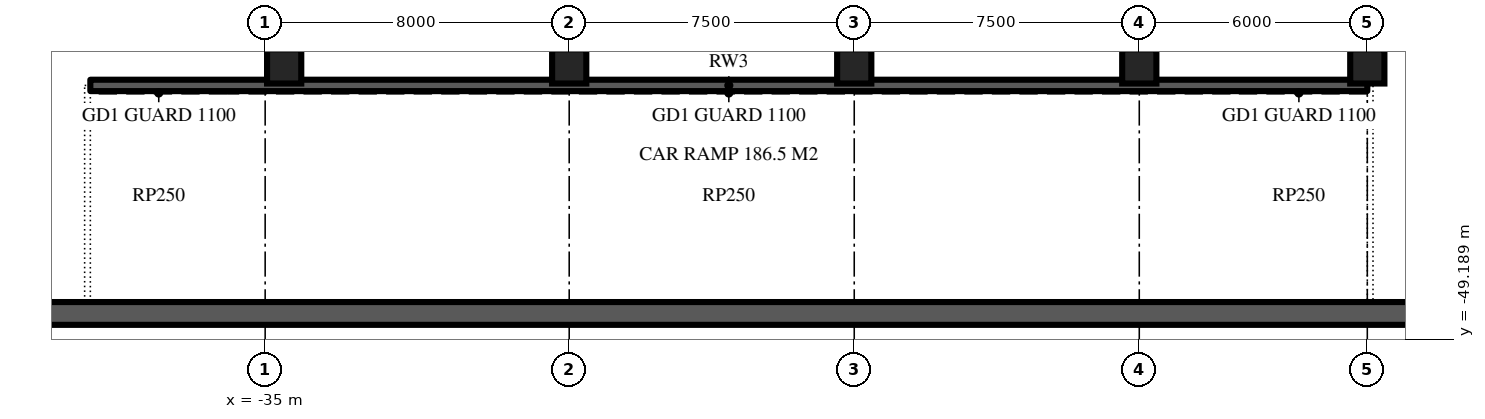
"""IFC4 building model, lengths in metres.
Left out: names, types, materials, properties, quantities, classifications, styles, units other than length and angle.
Written with IfcOpenShell. Run it as: python <this file> out.ifc"""

import sys

from ifc_helpers import new_model, si_unit, direction, frame, frame_2d, origin, origin_2d, place, context, subcontext, project, spatial, rectangle, extrude, element, save


model = new_model("IFC4")
c1 = context("Model", 3, precision=1e-05, world=origin(), true_north=direction((0.0, 1.0)))
c2 = subcontext(c1, "Body", "Model", "MODEL_VIEW")
j1 = project(units=[si_unit("LENGTHUNIT", "METRE"), si_unit("PLANEANGLEUNIT", "RADIAN")], contexts=[c1])
p1 = place(None, origin())
s1 = spatial("IfcSite", under=j1, at=p1, CompositionType="ELEMENT")
p2 = place(p1, origin())
s2 = spatial("IfcBuilding", under=s1, at=p2, CompositionType="ELEMENT")
p3 = place(p2, frame((0.0, 0.0, -10.0)))
s3 = spatial("IfcBuildingStorey", under=s2, at=p3, CompositionType="ELEMENT", Elevation=-10.0)
p4 = place(p3, frame((48.8, -48.5, -0.5), z_axis=(0.0, 0.0, 1.0), x_axis=(-1.0, 0.0, 0.0)))
e1 = element("IfcWall", 1, at=p4, inside=s3, PredefinedType="SOLIDWALL", context=c2, shape_type="SweptSolid", body=[
    extrude(rectangle(XDim=97.6, YDim=0.6, at=frame_2d((48.8, 0.0))), origin(), (0.0, 0.0, 1.0), 10.1),
])
for number, where, z_axis, x_axis in (
    (2, (-34.5, -42.0, -0.5), (0.0, 0.0, 1.0), (1.0, 0.0, 0.0)),
    (3, (-27.0, -42.0, -0.5), (0.0, 0.0, 1.0), (1.0, 0.0, 0.0)),
    (4, (-19.5, -42.0, -0.5), (0.0, 0.0, 1.0), (1.0, 0.0, 0.0)),
    (5, (-12.0, -42.0, -0.5), (0.0, 0.0, 1.0), (1.0, 0.0, 0.0)),
    (6, (-6.0, -42.0, -0.5), (0.0, 0.0, 1.0), (1.0, 0.0, 0.0)),
):
    element("IfcColumn", number, at=place(p3, frame(where, z_axis=z_axis, x_axis=x_axis)), inside=s3, PredefinedType="COLUMN", context=c2, shape_type="SweptSolid", body=[
        extrude(rectangle(XDim=0.9, YDim=0.9, at=origin_2d()), origin(), (0.0, 0.0, 1.0), 5.5),
    ])
p5 = place(p3, frame((-39.6, -42.5, 0.0), z_axis=(0.0, 0.0, 1.0), x_axis=(1.0, 0.0, 0.0)))
e7 = element("IfcWall", 7, at=p5, inside=s3, PredefinedType="SOLIDWALL", context=c2, shape_type="SweptSolid", body=[
    extrude(rectangle(XDim=33.6, YDim=0.3, at=frame_2d((16.8, 0.0))), origin(), (0.0, 0.0, 1.0), 4.7),
])
save(model, sys.argv[1])
